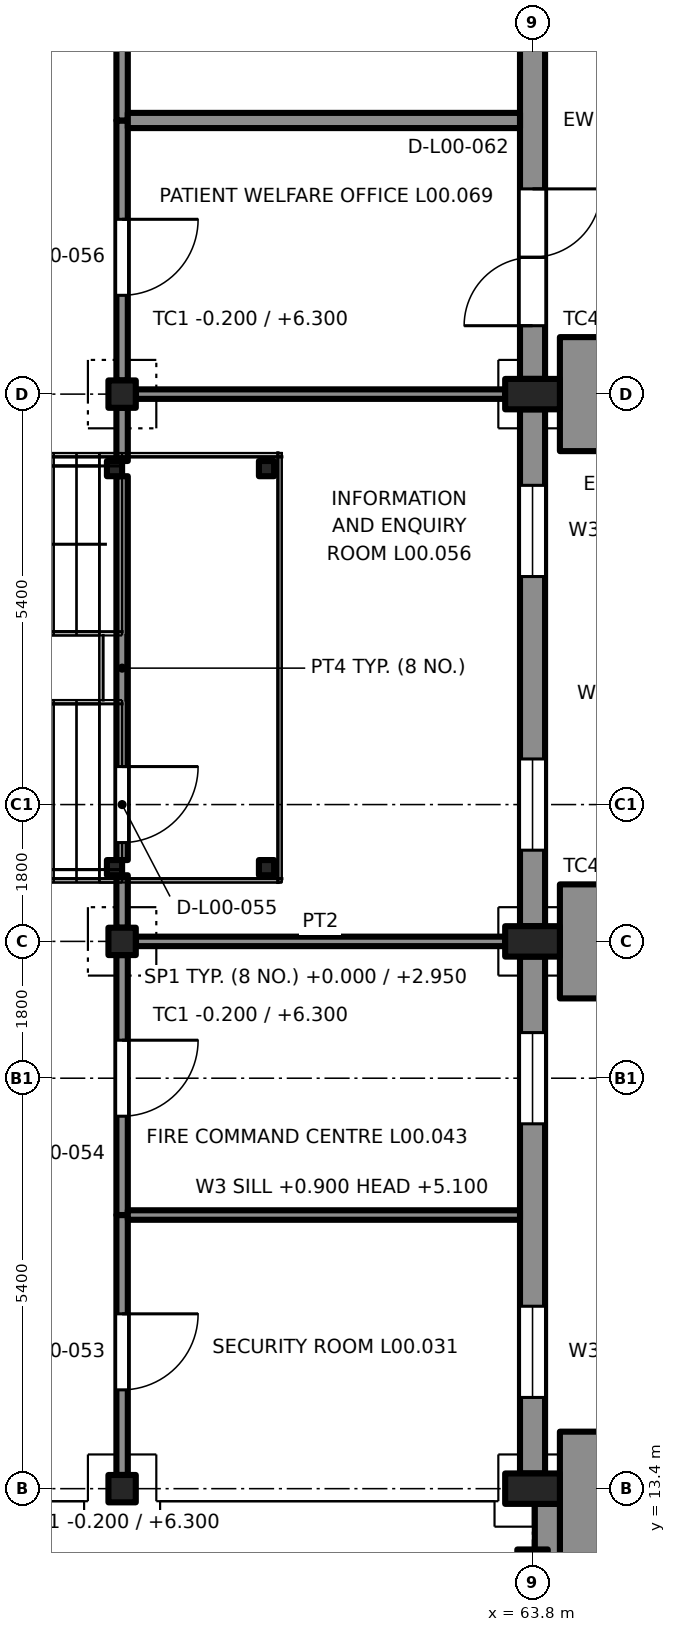
"""IFC4 building model, lengths in metres.
Left out: names, types, materials, properties, quantities, classifications, styles, units other than length and angle.
Written with IfcOpenShell. Run it as: python <this file> out.ifc"""

import sys

from ifc_helpers import new_model, si_unit, direction, frame, frame_2d, origin, origin_2d, place, context, subcontext, project, spatial, rectangle, extrude, element, fill, save


model = new_model("IFC4")
c1 = context("Model", 3, precision=1e-05, world=origin(), true_north=direction((0.0, 1.0)))
c2 = subcontext(c1, "Body", "Model", "MODEL_VIEW")
j1 = project(units=[si_unit("LENGTHUNIT", "METRE"), si_unit("PLANEANGLEUNIT", "RADIAN")], contexts=[c1])
p1 = place(None, origin())
s1 = spatial("IfcSite", under=j1, at=p1, CompositionType="ELEMENT")
p2 = place(p1, origin())
s2 = spatial("IfcBuilding", under=s1, at=p2, CompositionType="ELEMENT")
p3 = place(p2, origin())
s3 = spatial("IfcBuildingStorey", under=s2, at=p3, CompositionType="ELEMENT", Elevation=0.0)
for number, where, z_axis, x_axis in (
    (1, (63.8, 13.4, -0.2), (0.0, 0.0, 1.0), (0.0, 1.0, 0.0)),
    (2, (63.8, 20.6, -0.2), (0.0, 0.0, 1.0), (0.0, 1.0, 0.0)),
    (3, (63.8, 27.8, -0.2), (0.0, 0.0, 1.0), (0.0, 1.0, 0.0)),
):
    element("IfcColumn", number, at=place(p3, frame(where, z_axis=z_axis, x_axis=x_axis)), inside=s3, PredefinedType="COLUMN", context=c2, shape_type="SweptSolid", body=[
        extrude(rectangle(XDim=0.4, YDim=0.72, at=origin_2d()), origin(), (0.0, 0.0, 1.0), 6.5),
    ])
for number, where, z_axis, x_axis in (
    (4, (58.4, 13.4, -0.2), (0.0, 0.0, 1.0), (1.0, 0.0, 0.0)),
    (5, (58.4, 20.6, -0.2), (0.0, 0.0, 1.0), (1.0, 0.0, 0.0)),
    (6, (58.4, 27.8, -0.2), (0.0, 0.0, 1.0), (1.0, 0.0, 0.0)),
):
    element("IfcColumn", number, at=place(p3, frame(where, z_axis=z_axis, x_axis=x_axis)), inside=s3, PredefinedType="COLUMN", context=c2, shape_type="SweptSolid", body=[
        extrude(rectangle(XDim=0.36, YDim=0.36, at=origin_2d()), origin(), (0.0, 0.0, 1.0), 6.5),
    ])
p4 = place(p3, frame((63.8, 12.4, -0.2), z_axis=(0.0, 0.0, 1.0), x_axis=(1.0, 0.0, 0.0)))
e7 = element("IfcColumn", 7, at=p4, inside=s3, PredefinedType="COLUMN", context=c2, shape_type="SweptSolid", body=[
    extrude(rectangle(XDim=0.4, YDim=0.4, at=origin_2d()), origin(), (0.0, 0.0, 1.0), 4.133),
])
for number, where, z_axis, x_axis in (
    (8, (58.3, 21.57, 0.0), (0.0, 0.0, 1.0), (1.0, 0.0, 0.0)),
    (9, (58.3, 26.82, 0.0), (0.0, 0.0, 1.0), (1.0, 0.0, 0.0)),
    (10, (60.3, 21.57, 0.0), (0.0, 0.0, 1.0), (1.0, 0.0, 0.0)),
    (11, (60.3, 26.82, 0.0), (0.0, 0.0, 1.0), (1.0, 0.0, 0.0)),
):
    element("IfcColumn", number, at=place(p3, frame(where, z_axis=z_axis, x_axis=x_axis)), inside=s3, PredefinedType="COLUMN", context=c2, shape_type="SweptSolid", body=[
        extrude(rectangle(XDim=0.2, YDim=0.2, at=origin_2d()), origin(), (0.0, 0.0, 1.0), 2.95),
    ])
p5 = place(p3, frame((63.8, 20.4, 0.0), z_axis=(0.0, 0.0, 1.0), x_axis=(0.0, -1.0, 0.0)))
e12 = element("IfcWall", 12, at=p5, inside=s3, PredefinedType="SOLIDWALL", context=c2, shape_type="SweptSolid", body=[
    extrude(rectangle(XDim=6.8, YDim=0.33, at=frame_2d((3.4, 0.0))), origin(), (0.0, 0.0, 1.0), 5.62),
])
p6 = place(p5, frame((4.6, 0.0, 0.9)))
e13 = element("IfcOpeningElement", 13, at=p6, cuts=e12, PredefinedType="OPENING", context=c2, shape_type="SweptSolid", body=[
    extrude(rectangle(XDim=1.2, YDim=4.2, at=frame_2d((0.6, 2.1))), frame((0.0, 0.175, 0.0), z_axis=(0.0, -1.0, 0.0), x_axis=(1.0, 0.0, 0.0)), (0.0, 0.0, 1.0), 0.35),
])
p7 = place(p5, frame((1.0, 0.0, 0.9)))
e14 = element("IfcOpeningElement", 14, at=p7, cuts=e12, PredefinedType="OPENING", context=c2, shape_type="SweptSolid", body=[
    extrude(rectangle(XDim=1.2, YDim=4.2, at=frame_2d((0.6, 2.1))), frame((0.0, 0.175, 0.0), z_axis=(0.0, -1.0, 0.0), x_axis=(1.0, 0.0, 0.0)), (0.0, 0.0, 1.0), 0.35),
])
p8 = place(p3, frame((63.8, 27.6, 0.0), z_axis=(0.0, 0.0, 1.0), x_axis=(0.0, -1.0, 0.0)))
e15 = element("IfcWall", 15, at=p8, inside=s3, PredefinedType="SOLIDWALL", context=c2, shape_type="SweptSolid", body=[
    extrude(rectangle(XDim=6.8, YDim=0.33, at=frame_2d((3.4, 0.0))), origin(), (0.0, 0.0, 1.0), 5.62),
])
p9 = place(p8, frame((4.6, 0.0, 0.9)))
e16 = element("IfcOpeningElement", 16, at=p9, cuts=e15, PredefinedType="OPENING", context=c2, shape_type="SweptSolid", body=[
    extrude(rectangle(XDim=1.2, YDim=4.2, at=frame_2d((0.6, 2.1))), frame((0.0, 0.175, 0.0), z_axis=(0.0, -1.0, 0.0), x_axis=(1.0, 0.0, 0.0)), (0.0, 0.0, 1.0), 0.35),
])
p10 = place(p8, frame((1.0, 0.0, 0.9)))
e17 = element("IfcOpeningElement", 17, at=p10, cuts=e15, PredefinedType="OPENING", context=c2, shape_type="SweptSolid", body=[
    extrude(rectangle(XDim=1.2, YDim=4.2, at=frame_2d((0.6, 2.1))), frame((0.0, 0.175, 0.0), z_axis=(0.0, -1.0, 0.0), x_axis=(1.0, 0.0, 0.0)), (0.0, 0.0, 1.0), 0.35),
])
p11 = place(p3, frame((63.8, 34.8, 0.0), z_axis=(0.0, 0.0, 1.0), x_axis=(0.0, -1.0, 0.0)))
e18 = element("IfcWall", 18, at=p11, inside=s3, PredefinedType="SOLIDWALL", context=c2, shape_type="SweptSolid", body=[
    extrude(rectangle(XDim=6.8, YDim=0.33, at=frame_2d((3.4, 0.0))), origin(), (0.0, 0.0, 1.0), 5.62),
])
p12 = place(p11, frame((4.3, 0.0, 0.0)))
e19 = element("IfcOpeningElement", 19, at=p12, cuts=e18, PredefinedType="OPENING", context=c2, shape_type="SweptSolid", body=[
    extrude(rectangle(XDim=1.8, YDim=2.4, at=frame_2d((0.9, 1.2))), frame((0.0, 0.175, 0.0), z_axis=(0.0, -1.0, 0.0), x_axis=(1.0, 0.0, 0.0)), (0.0, 0.0, 1.0), 0.35),
])
p13 = place(p11, frame((1.0, 0.0, 0.9)))
e20 = element("IfcOpeningElement", 20, at=p13, cuts=e18, PredefinedType="OPENING", context=c2, shape_type="SweptSolid", body=[
    extrude(rectangle(XDim=1.2, YDim=4.2, at=frame_2d((0.6, 2.1))), frame((0.0, 0.175, 0.0), z_axis=(0.0, -1.0, 0.0), x_axis=(1.0, 0.0, 0.0)), (0.0, 0.0, 1.0), 0.35),
])
p14 = place(p3, frame((64.71, 14.15, 0.0), z_axis=(0.0, 0.0, 1.0), x_axis=(0.0, -1.0, 0.0)))
e21 = element("IfcWall", 21, at=p14, inside=s3, PredefinedType="SOLIDWALL", context=c2, shape_type="SweptSolid", body=[
    extrude(rectangle(XDim=1.68, YDim=1.1, at=frame_2d((0.84, 0.0))), origin(), (0.0, 0.0, 1.0), 6.3),
])
for number, where, z_axis, x_axis in (
    (22, (64.71, 21.35, 0.0), (0.0, 0.0, 1.0), (0.0, -1.0, 0.0)),
    (23, (64.71, 28.55, 0.0), (0.0, 0.0, 1.0), (0.0, -1.0, 0.0)),
):
    element("IfcWall", number, at=place(p3, frame(where, z_axis=z_axis, x_axis=x_axis)), inside=s3, PredefinedType="SOLIDWALL", context=c2, shape_type="SweptSolid", body=[
        extrude(rectangle(XDim=1.5, YDim=1.1, at=frame_2d((0.75, 0.0))), origin(), (0.0, 0.0, 1.0), 6.3),
    ])
p15 = place(p3, frame((63.995, 13.2, 0.0), z_axis=(0.0, 0.0, 1.0), x_axis=(0.0, -1.0, 0.0)))
e24 = element("IfcWall", 24, at=p15, inside=s3, PredefinedType="SOLIDWALL", context=c2, shape_type="SweptSolid", body=[
    extrude(rectangle(XDim=1.635, YDim=0.33, at=frame_2d((0.817, 0.0))), origin(), (0.0, 0.0, 1.0), 9.7),
])
p16 = place(p3, frame((58.4, 17.0, 0.0), z_axis=(0.0, 0.0, 1.0), x_axis=(0.0, -1.0, 0.0)))
e25 = element("IfcWall", 25, at=p16, inside=s3, PredefinedType="PARTITIONING", context=c2, shape_type="SweptSolid", body=[
    extrude(rectangle(XDim=3.42, YDim=0.15, at=frame_2d((1.71, 0.0))), origin(), (0.0, 0.0, 1.0), 5.62),
])
p17 = place(p16, frame((1.3, 0.0, 0.0)))
e26 = element("IfcOpeningElement", 26, at=p17, cuts=e25, PredefinedType="OPENING", context=c2, shape_type="SweptSolid", body=[
    extrude(rectangle(XDim=1.0, YDim=2.1, at=frame_2d((0.5, 1.05))), frame((0.0, 0.085, 0.0), z_axis=(0.0, -1.0, 0.0), x_axis=(1.0, 0.0, 0.0)), (0.0, 0.0, 1.0), 0.17),
])
p18 = place(p3, frame((58.4, 20.42, 0.0), z_axis=(0.0, 0.0, 1.0), x_axis=(0.0, -1.0, 0.0)))
e27 = element("IfcWall", 27, at=p18, inside=s3, PredefinedType="PARTITIONING", context=c2, shape_type="SweptSolid", body=[
    extrude(rectangle(XDim=3.42, YDim=0.15, at=frame_2d((1.71, 0.0))), origin(), (0.0, 0.0, 1.0), 5.62),
])
p19 = place(p18, frame((1.12, 0.0, 0.0)))
e28 = element("IfcOpeningElement", 28, at=p19, cuts=e27, PredefinedType="OPENING", context=c2, shape_type="SweptSolid", body=[
    extrude(rectangle(XDim=1.0, YDim=2.1, at=frame_2d((0.5, 1.05))), frame((0.0, 0.085, 0.0), z_axis=(0.0, -1.0, 0.0), x_axis=(1.0, 0.0, 0.0)), (0.0, 0.0, 1.0), 0.17),
])
p20 = place(p3, frame((63.635, 17.0, 0.0), z_axis=(0.0, 0.0, 1.0), x_axis=(-1.0, 0.0, 0.0)))
e29 = element("IfcWall", 29, at=p20, inside=s3, PredefinedType="PARTITIONING", context=c2, shape_type="SweptSolid", body=[
    extrude(rectangle(XDim=5.16, YDim=0.125, at=frame_2d((2.58, 0.0))), origin(), (0.0, 0.0, 1.0), 6.26),
])
p21 = place(p3, frame((58.4, 21.47, 0.0), z_axis=(0.0, 0.0, 1.0), x_axis=(0.0, -1.0, 0.0)))
e30 = element("IfcWall", 30, at=p21, inside=s3, PredefinedType="PARTITIONING", context=c2, shape_type="SweptSolid", body=[
    extrude(rectangle(XDim=0.69, YDim=0.15, at=frame_2d((0.345, 0.0))), origin(), (0.0, 0.0, 1.0), 5.62),
])
p22 = place(p3, frame((58.4, 26.72, 0.0), z_axis=(0.0, 0.0, 1.0), x_axis=(0.0, -1.0, 0.0)))
e31 = element("IfcWall", 31, at=p22, inside=s3, PredefinedType="PARTITIONING", context=c2, shape_type="SweptSolid", body=[
    extrude(rectangle(XDim=5.05, YDim=0.15, at=frame_2d((2.525, 0.0))), origin(), (0.0, 0.0, 1.0), 5.62),
])
p23 = place(p22, frame((3.82, 0.0, 0.0)))
e32 = element("IfcOpeningElement", 32, at=p23, cuts=e31, PredefinedType="OPENING", context=c2, shape_type="SweptSolid", body=[
    extrude(rectangle(XDim=1.0, YDim=2.1, at=frame_2d((0.5, 1.05))), frame((0.0, 0.085, 0.0), z_axis=(0.0, -1.0, 0.0), x_axis=(1.0, 0.0, 0.0)), (0.0, 0.0, 1.0), 0.17),
])
p24 = place(p3, frame((58.4, 27.62, 0.0), z_axis=(0.0, 0.0, 1.0), x_axis=(0.0, -1.0, 0.0)))
e33 = element("IfcWall", 33, at=p24, inside=s3, PredefinedType="PARTITIONING", context=c2, shape_type="SweptSolid", body=[
    extrude(rectangle(XDim=0.7, YDim=0.15, at=frame_2d((0.35, 0.0))), origin(), (0.0, 0.0, 1.0), 5.62),
])
p25 = place(p3, frame((63.44, 20.6, 0.0), z_axis=(0.0, 0.0, 1.0), x_axis=(-1.0, 0.0, 0.0)))
e34 = element("IfcWall", 34, at=p25, inside=s3, PredefinedType="PARTITIONING", context=c2, shape_type="SweptSolid", body=[
    extrude(rectangle(XDim=4.86, YDim=0.125, at=frame_2d((2.43, 0.0))), origin(), (0.0, 0.0, 1.0), 6.26),
])
p26 = place(p3, frame((58.4, 31.4, 0.0), z_axis=(0.0, 0.0, 1.0), x_axis=(0.0, -1.0, 0.0)))
e35 = element("IfcWall", 35, at=p26, inside=s3, PredefinedType="PARTITIONING", context=c2, shape_type="SweptSolid", body=[
    extrude(rectangle(XDim=3.42, YDim=0.15, at=frame_2d((1.71, 0.0))), origin(), (0.0, 0.0, 1.0), 5.62),
])
p27 = place(p26, frame((1.3, 0.0, 0.0)))
e36 = element("IfcOpeningElement", 36, at=p27, cuts=e35, PredefinedType="OPENING", context=c2, shape_type="SweptSolid", body=[
    extrude(rectangle(XDim=1.0, YDim=2.1, at=frame_2d((0.5, 1.05))), frame((0.0, 0.085, 0.0), z_axis=(0.0, -1.0, 0.0), x_axis=(1.0, 0.0, 0.0)), (0.0, 0.0, 1.0), 0.17),
])
p28 = place(p3, frame((63.44, 27.8, 0.0), z_axis=(0.0, 0.0, 1.0), x_axis=(-1.0, 0.0, 0.0)))
e37 = element("IfcWall", 37, at=p28, inside=s3, PredefinedType="PARTITIONING", context=c2, shape_type="SweptSolid", body=[
    extrude(rectangle(XDim=4.86, YDim=0.125, at=frame_2d((2.43, 0.0))), origin(), (0.0, 0.0, 1.0), 6.26),
])
p29 = place(p3, frame((58.4, 34.82, 0.0), z_axis=(0.0, 0.0, 1.0), x_axis=(0.0, -1.0, 0.0)))
e38 = element("IfcWall", 38, at=p29, inside=s3, PredefinedType="PARTITIONING", context=c2, shape_type="SweptSolid", body=[
    extrude(rectangle(XDim=3.42, YDim=0.15, at=frame_2d((1.71, 0.0))), origin(), (0.0, 0.0, 1.0), 5.62),
])
p30 = place(p29, frame((1.12, 0.0, 0.0)))
e39 = element("IfcOpeningElement", 39, at=p30, cuts=e38, PredefinedType="OPENING", context=c2, shape_type="SweptSolid", body=[
    extrude(rectangle(XDim=1.0, YDim=2.1, at=frame_2d((0.5, 1.05))), frame((0.0, 0.085, 0.0), z_axis=(0.0, -1.0, 0.0), x_axis=(1.0, 0.0, 0.0)), (0.0, 0.0, 1.0), 0.17),
])
p31 = place(p3, frame((63.635, 31.4, 0.0), z_axis=(0.0, 0.0, 1.0), x_axis=(-1.0, 0.0, 0.0)))
e40 = element("IfcWall", 40, at=p31, inside=s3, PredefinedType="PARTITIONING", context=c2, shape_type="SweptSolid", body=[
    extrude(rectangle(XDim=5.16, YDim=0.2, at=frame_2d((2.58, 0.0))), origin(), (0.0, 0.0, 1.0), 6.26),
])
p32 = place(p6, origin())
e41 = element("IfcWindow", 41, at=p32, inside=s3, PartitioningType="SINGLE_PANEL", PredefinedType="WINDOW", context=c2, shape_type="SweptSolid", body=[
    extrude(rectangle(XDim=1.2, YDim=4.2, at=frame_2d((0.6, 2.1))), frame((0.0, -0.03, 0.0), z_axis=(0.0, -1.0, 0.0), x_axis=(1.0, 0.0, 0.0)), (0.0, 0.0, 1.0), 0.06),
])
fill(e13, e41)
p33 = place(p7, origin())
e42 = element("IfcWindow", 42, at=p33, inside=s3, PartitioningType="SINGLE_PANEL", PredefinedType="WINDOW", context=c2, shape_type="SweptSolid", body=[
    extrude(rectangle(XDim=1.2, YDim=4.2, at=frame_2d((0.6, 2.1))), frame((0.0, -0.03, 0.0), z_axis=(0.0, -1.0, 0.0), x_axis=(1.0, 0.0, 0.0)), (0.0, 0.0, 1.0), 0.06),
])
fill(e14, e42)
p34 = place(p9, origin())
e43 = element("IfcWindow", 43, at=p34, inside=s3, PartitioningType="SINGLE_PANEL", PredefinedType="WINDOW", context=c2, shape_type="SweptSolid", body=[
    extrude(rectangle(XDim=1.2, YDim=4.2, at=frame_2d((0.6, 2.1))), frame((0.0, -0.03, 0.0), z_axis=(0.0, -1.0, 0.0), x_axis=(1.0, 0.0, 0.0)), (0.0, 0.0, 1.0), 0.06),
])
fill(e16, e43)
p35 = place(p10, origin())
e44 = element("IfcWindow", 44, at=p35, inside=s3, PartitioningType="SINGLE_PANEL", PredefinedType="WINDOW", context=c2, shape_type="SweptSolid", body=[
    extrude(rectangle(XDim=1.2, YDim=4.2, at=frame_2d((0.6, 2.1))), frame((0.0, -0.03, 0.0), z_axis=(0.0, -1.0, 0.0), x_axis=(1.0, 0.0, 0.0)), (0.0, 0.0, 1.0), 0.06),
])
fill(e17, e44)
p36 = place(p12, origin())
e45 = element("IfcDoor", 45, at=p36, inside=s3, OperationType="DOUBLE_DOOR_SINGLE_SWING", PredefinedType="DOOR", context=c2, shape_type="SweptSolid", body=[
    extrude(rectangle(XDim=1.8, YDim=2.4, at=frame_2d((0.9, 1.2))), frame((0.0, 0.025, 0.0), z_axis=(0.0, -1.0, 0.0), x_axis=(1.0, 0.0, 0.0)), (0.0, 0.0, 1.0), 0.05),
])
fill(e19, e45)
p37 = place(p17, origin())
e46 = element("IfcDoor", 46, at=p37, inside=s3, OperationType="SINGLE_SWING_RIGHT", PredefinedType="DOOR", context=c2, shape_type="SweptSolid", body=[
    extrude(rectangle(XDim=1.0, YDim=2.1, at=frame_2d((0.5, 1.05))), frame((0.0, 0.025, 0.0), z_axis=(0.0, -1.0, 0.0), x_axis=(1.0, 0.0, 0.0)), (0.0, 0.0, 1.0), 0.05),
])
fill(e26, e46)
p38 = place(p19, origin())
e47 = element("IfcDoor", 47, at=p38, inside=s3, OperationType="SINGLE_SWING_LEFT", PredefinedType="DOOR", context=c2, shape_type="SweptSolid", body=[
    extrude(rectangle(XDim=1.0, YDim=2.1, at=frame_2d((0.5, 1.05))), frame((0.0, 0.025, 0.0), z_axis=(0.0, -1.0, 0.0), x_axis=(1.0, 0.0, 0.0)), (0.0, 0.0, 1.0), 0.05),
])
fill(e28, e47)
p39 = place(p23, origin())
e48 = element("IfcDoor", 48, at=p39, inside=s3, OperationType="SINGLE_SWING_RIGHT", PredefinedType="DOOR", context=c2, shape_type="SweptSolid", body=[
    extrude(rectangle(XDim=1.0, YDim=2.1, at=frame_2d((0.5, 1.05))), frame((0.0, 0.025, 0.0), z_axis=(0.0, -1.0, 0.0), x_axis=(1.0, 0.0, 0.0)), (0.0, 0.0, 1.0), 0.05),
])
fill(e32, e48)
p40 = place(p27, origin())
e49 = element("IfcDoor", 49, at=p40, inside=s3, OperationType="SINGLE_SWING_RIGHT", PredefinedType="DOOR", context=c2, shape_type="SweptSolid", body=[
    extrude(rectangle(XDim=1.0, YDim=2.1, at=frame_2d((0.5, 1.05))), frame((0.0, 0.025, 0.0), z_axis=(0.0, -1.0, 0.0), x_axis=(1.0, 0.0, 0.0)), (0.0, 0.0, 1.0), 0.05),
])
fill(e36, e49)
save(model, sys.argv[1])
